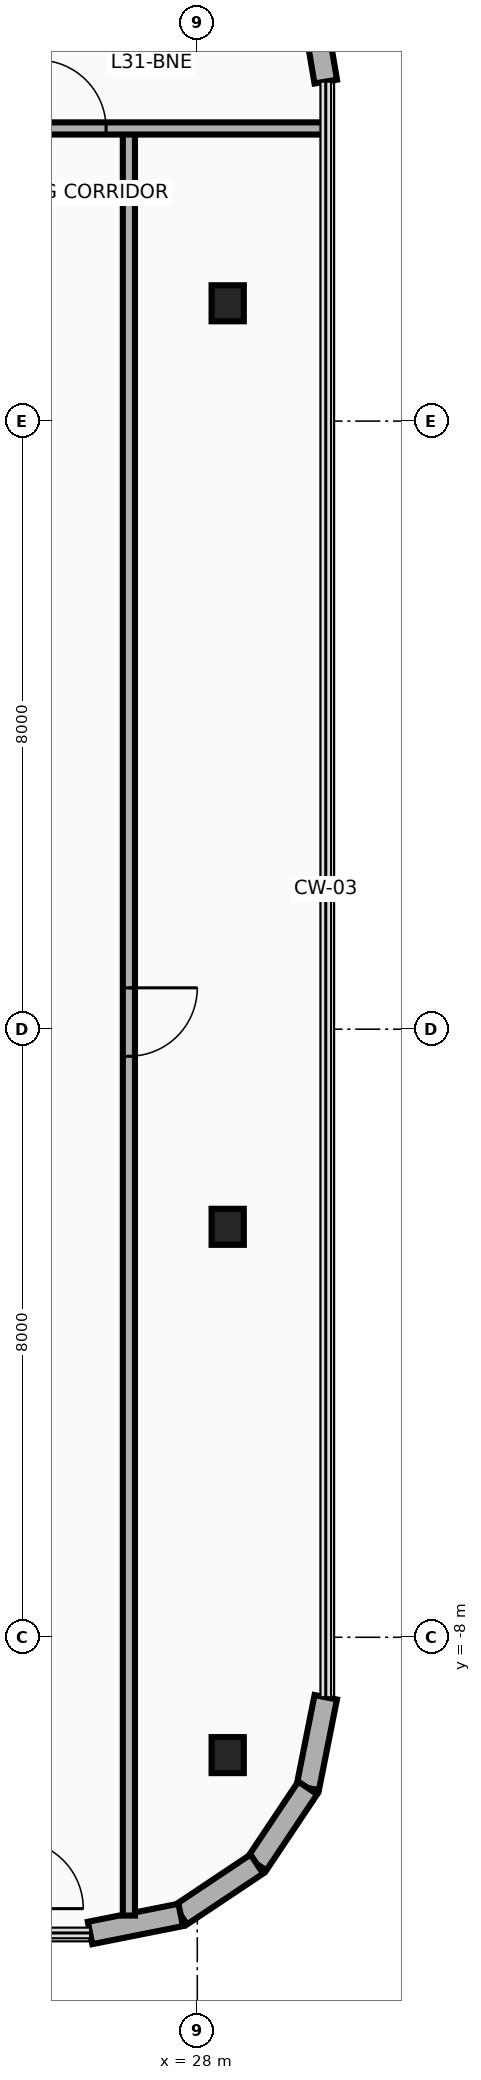
"""IFC4 building model, lengths in metres.
Left out: names, types, materials, properties, quantities, classifications, styles, units other than length and angle.
Written with IfcOpenShell. Run it as: python <this file> out.ifc"""

import sys

from ifc_helpers import new_model, si_unit, direction, frame, frame_2d, origin, origin_2d, place, context, subcontext, project, spatial, rectangle, i_section, extrude, source, transform, mapped, element, fill, save


model = new_model("IFC4")
c1 = context("Model", 3, precision=1e-05, world=origin(), true_north=direction((0.0, 1.0)))
c2 = subcontext(c1, "Body", "Model", "MODEL_VIEW")
j1 = project(units=[si_unit("LENGTHUNIT", "METRE"), si_unit("PLANEANGLEUNIT", "RADIAN")], contexts=[c1])
p1 = place(None, origin())
s1 = spatial("IfcSite", under=j1, at=p1, CompositionType="ELEMENT")
p2 = place(p1, origin())
s2 = spatial("IfcBuilding", under=s1, at=p2, CompositionType="ELEMENT")
p3 = place(p2, frame((0.0, 0.0, 124.2)))
s3 = spatial("IfcBuildingStorey", under=s2, at=p3, CompositionType="ELEMENT", Elevation=124.2)
m1 = source(origin(), c2, "Body", "SweptSolid", [
    extrude(i_section(OverallWidth=0.424, OverallDepth=0.474, WebThickness=0.048, FlangeThickness=0.077, at=origin_2d()), origin(), (0.0, 0.0, 1.0), 3.7),
])
for number, where, z_axis, x_axis in (
    (1, (28.4, -9.55, 0.0), (0.0, 0.0, 1.0), (1.0, 0.0, 0.0)),
    (2, (28.4, -2.6, 0.0), (0.0, 0.0, 1.0), (1.0, 0.0, 0.0)),
    (3, (28.4, 9.55, 0.0), (0.0, 0.0, 1.0), (1.0, 0.0, 0.0)),
):
    element("IfcColumn", number, at=place(p3, frame(where, z_axis=z_axis, x_axis=x_axis)), inside=s3, PredefinedType="COLUMN", context=c2, shape_type="MappedRepresentation", body=[
        mapped(m1, transform((0.0, 0.0, 0.0), x_axis=(1.0, 0.0, 0.0), y_axis=(0.0, 1.0, 0.0), z_axis=(0.0, 0.0, 1.0), scale=1.0)),
    ])
p4 = place(p3, frame((29.518, 13.488, 0.0), z_axis=(0.0, 0.0, 1.0), x_axis=(0.166156796952, -0.986099345313, 0.0)))
e4 = element("IfcWall", 4, at=p4, inside=s3, PredefinedType="SOLIDWALL", context=c2, shape_type="SweptSolid", body=[
    extrude(rectangle(XDim=1.036, YDim=0.3, at=frame_2d((0.518, 0.0))), origin(), (0.0, 0.0, 1.0), 3.46),
])
p5 = place(p3, frame((29.69, -8.789, 0.0), z_axis=(0.0, 0.0, 1.0), x_axis=(-0.194996050505, -0.980804027463, 0.0)))
e5 = element("IfcWall", 5, at=p5, inside=s3, PredefinedType="SOLIDWALL", context=c2, shape_type="SweptSolid", body=[
    extrude(rectangle(XDim=1.216, YDim=0.3, at=frame_2d((0.608, 0.0))), origin(), (0.0, 0.0, 1.0), 3.46),
])
for number, where, z_axis, x_axis in (
    (6, (29.453, -9.982, 0.0), (0.0, 0.0, 1.0), (-0.556, -0.831, 0.0)),
    (7, (28.783, -10.983, 0.0), (0.0, 0.0, 1.0), (-0.831, -0.556, 0.0)),
):
    element("IfcWall", number, at=place(p3, frame(where, z_axis=z_axis, x_axis=x_axis)), inside=s3, PredefinedType="SOLIDWALL", context=c2, shape_type="SweptSolid", body=[
        extrude(rectangle(XDim=1.205, YDim=0.3, at=frame_2d((0.603, 0.0))), origin(), (0.0, 0.0, 1.0), 3.46),
    ])
p6 = place(p3, frame((27.782, -11.653, 0.0), z_axis=(0.0, 0.0, 1.0), x_axis=(-0.980811661072, -0.194957650543, 0.0)))
e8 = element("IfcWall", 8, at=p6, inside=s3, PredefinedType="SOLIDWALL", context=c2, shape_type="SweptSolid", body=[
    extrude(rectangle(XDim=1.216, YDim=0.3, at=frame_2d((0.608, 0.0))), origin(), (0.0, 0.0, 1.0), 3.46),
])
p7 = place(p3, frame((27.1, -11.661, 0.0), z_axis=(0.0, 0.0, 1.0), x_axis=(0.0, 1.0, 0.0)))
e9 = element("IfcWall", 9, at=p7, inside=s3, PredefinedType="PARTITIONING", context=c2, shape_type="SweptSolid", body=[
    extrude(rectangle(XDim=23.511, YDim=0.16, at=frame_2d((11.755, 0.0))), origin(), (0.0, 0.0, 1.0), 2.666),
])
p8 = place(p7, frame((11.305, 0.0, 0.0)))
e10 = element("IfcOpeningElement", 10, at=p8, cuts=e9, PredefinedType="OPENING", context=c2, shape_type="SweptSolid", body=[
    extrude(rectangle(XDim=0.9, YDim=2.1, at=frame_2d((0.45, 1.05))), frame((0.0, 0.095, 0.0), z_axis=(0.0, -1.0, 0.0), x_axis=(1.0, 0.0, 0.0)), (0.0, 0.0, 1.0), 0.19),
])
p9 = place(p3, frame((25.6, 11.85, 0.0), z_axis=(0.0, 0.0, 1.0), x_axis=(1.0, 0.0, 0.0)))
e11 = element("IfcWall", 11, at=p9, inside=s3, PredefinedType="PARTITIONING", context=c2, shape_type="SweptSolid", body=[
    extrude(rectangle(XDim=4.09, YDim=0.16, at=frame_2d((2.045, 0.0))), origin(), (0.0, 0.0, 1.0), 2.896),
])
p10 = place(p9, frame((0.3, 0.0, 0.0)))
e12 = element("IfcOpeningElement", 12, at=p10, cuts=e11, PredefinedType="OPENING", context=c2, shape_type="SweptSolid", body=[
    extrude(rectangle(XDim=0.9, YDim=2.1, at=frame_2d((0.45, 1.05))), frame((0.0, 0.095, 0.0), z_axis=(0.0, -1.0, 0.0), x_axis=(1.0, 0.0, 0.0)), (0.0, 0.0, 1.0), 0.19),
])
p11 = place(p10, origin())
e13 = element("IfcDoor", 13, at=p11, inside=s3, OperationType="SINGLE_SWING_RIGHT", PredefinedType="DOOR", context=c2, shape_type="SweptSolid", body=[
    extrude(rectangle(XDim=0.9, YDim=2.1, at=frame_2d((0.45, 1.05))), frame((0.0, 0.025, 0.0), z_axis=(0.0, -1.0, 0.0), x_axis=(1.0, 0.0, 0.0)), (0.0, 0.0, 1.0), 0.05),
])
fill(e12, e13)
p12 = place(p8, frame((0.9, 0.0, 0.0), z_axis=(0.0, 0.0, 1.0), x_axis=(-1.0, 0.0, 0.0)))
e14 = element("IfcDoor", 14, at=p12, inside=s3, OperationType="SINGLE_SWING_LEFT", PredefinedType="DOOR", context=c2, shape_type="SweptSolid", body=[
    extrude(rectangle(XDim=0.9, YDim=2.1, at=frame_2d((0.45, 1.05))), frame((0.0, 0.025, 0.0), z_axis=(0.0, -1.0, 0.0), x_axis=(1.0, 0.0, 0.0)), (0.0, 0.0, 1.0), 0.05),
])
fill(e10, e14)
save(model, sys.argv[1])
